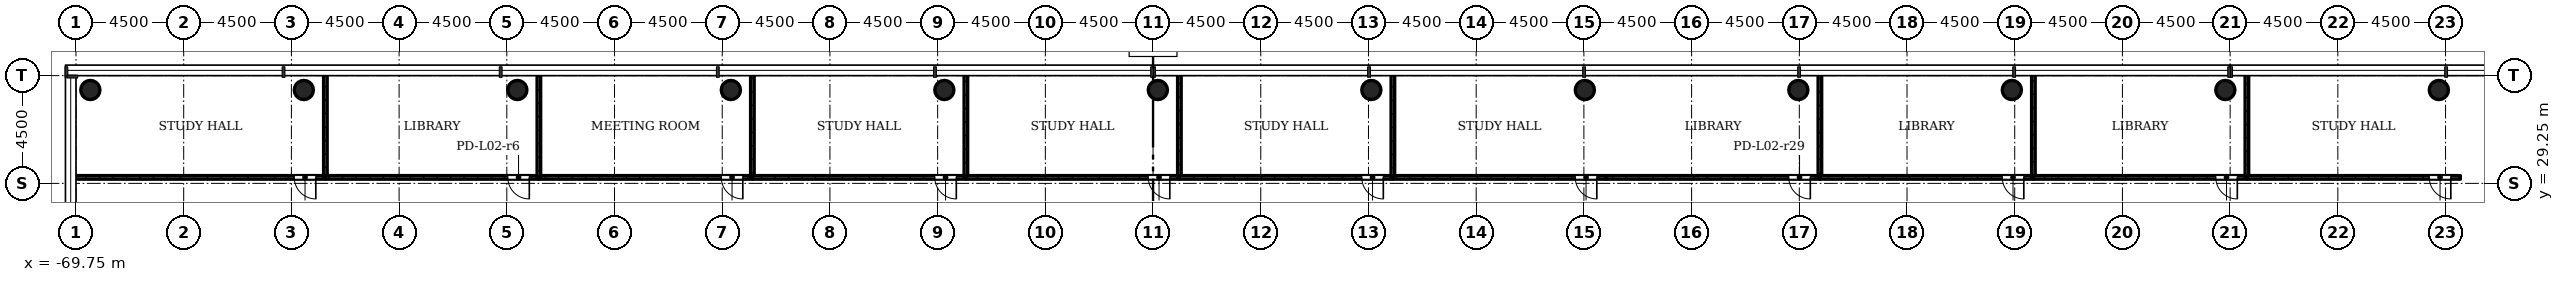
"""IFC4 building model, lengths in metres.
Left out: names, types, materials, properties, quantities, classifications, styles, units other than length and angle.
Written with IfcOpenShell. Run it as: python <this file> out.ifc"""

import sys

from ifc_helpers import new_model, si_unit, direction, frame, frame_2d, origin, origin_2d, place, context, subcontext, project, spatial, rectangle, hollow_circle, extrude, element, fill, save


model = new_model("IFC4")
c1 = context("Model", 3, precision=1e-05, world=origin(), true_north=direction((0.0, 1.0)))
c2 = subcontext(c1, "Body", "Model", "MODEL_VIEW")
j1 = project(units=[si_unit("LENGTHUNIT", "METRE"), si_unit("PLANEANGLEUNIT", "RADIAN")], contexts=[c1])
p1 = place(None, origin())
s1 = spatial("IfcSite", under=j1, at=p1, CompositionType="ELEMENT")
p2 = place(p1, origin())
s2 = spatial("IfcBuilding", under=s1, at=p2, CompositionType="ELEMENT")
p3 = place(p2, frame((0.0, 0.0, 11.0)))
s3 = spatial("IfcBuildingStorey", under=s2, at=p3, CompositionType="ELEMENT", Elevation=11.0)
for number, where, z_axis, x_axis in (
    (1, (-69.15, 33.15, 0.0), (0.0, 0.0, 1.0), (1.0, 0.0, 0.0)),
    (2, (-60.23, 33.15, 0.0), (0.0, 0.0, 1.0), (1.0, 0.0, 0.0)),
    (3, (-51.31, 33.15, 0.0), (0.0, 0.0, 1.0), (1.0, 0.0, 0.0)),
    (4, (-42.39, 33.15, 0.0), (0.0, 0.0, 1.0), (1.0, 0.0, 0.0)),
    (5, (-33.47, 33.15, 0.0), (0.0, 0.0, 1.0), (1.0, 0.0, 0.0)),
    (6, (-24.55, 33.15, 0.0), (0.0, 0.0, 1.0), (1.0, 0.0, 0.0)),
    (7, (-15.63, 33.15, 0.0), (0.0, 0.0, 1.0), (1.0, 0.0, 0.0)),
    (8, (-6.71, 33.15, 0.0), (0.0, 0.0, 1.0), (1.0, 0.0, 0.0)),
    (9, (2.21, 33.15, 0.0), (0.0, 0.0, 1.0), (1.0, 0.0, 0.0)),
    (10, (11.13, 33.15, 0.0), (0.0, 0.0, 1.0), (1.0, 0.0, 0.0)),
    (11, (20.05, 33.15, 0.0), (0.0, 0.0, 1.0), (1.0, 0.0, 0.0)),
    (12, (28.97, 33.15, 0.0), (0.0, 0.0, 1.0), (1.0, 0.0, 0.0)),
):
    element("IfcColumn", number, at=place(p3, frame(where, z_axis=z_axis, x_axis=x_axis)), inside=s3, PredefinedType="COLUMN", context=c2, shape_type="SweptSolid", body=[
        extrude(hollow_circle(Radius=0.4, WallThickness=0.028, at=origin_2d()), origin(), (0.0, 0.0, 1.0), 4.5),
    ])
p4 = place(p3, frame((-59.33, 29.5, 0.0), z_axis=(0.0, 0.0, 1.0), x_axis=(-1.0, 0.0, 0.0)))
e13 = element("IfcWall", 13, at=p4, inside=s3, PredefinedType="PARTITIONING", context=c2, shape_type="SweptSolid", body=[
    extrude(rectangle(XDim=10.52, YDim=0.15, at=frame_2d((5.26, 0.0))), origin(), (0.0, 0.0, 1.0), 4.08),
])
p5 = place(p4, frame((0.4, 0.0, 0.0)))
e14 = element("IfcOpeningElement", 14, at=p5, cuts=e13, PredefinedType="OPENING", context=c2, shape_type="SweptSolid", body=[
    extrude(rectangle(XDim=0.9, YDim=2.1, at=frame_2d((0.45, 1.05))), frame((0.0, 0.085, 0.0), z_axis=(0.0, -1.0, 0.0), x_axis=(1.0, 0.0, 0.0)), (0.0, 0.0, 1.0), 0.17),
])
p6 = place(p3, frame((-59.33, 33.85, 0.0), z_axis=(0.0, 0.0, 1.0), x_axis=(0.0, -1.0, 0.0)))
e15 = element("IfcWall", 15, at=p6, inside=s3, PredefinedType="PARTITIONING", context=c2, shape_type="SweptSolid", body=[
    extrude(rectangle(XDim=4.35, YDim=0.15, at=frame_2d((2.175, 0.0))), origin(), (0.0, 0.0, 1.0), 4.08),
])
p7 = place(p3, frame((-50.41, 29.5, 0.0), z_axis=(0.0, 0.0, 1.0), x_axis=(-1.0, 0.0, 0.0)))
e16 = element("IfcWall", 16, at=p7, inside=s3, PredefinedType="PARTITIONING", context=c2, shape_type="SweptSolid", body=[
    extrude(rectangle(XDim=8.92, YDim=0.15, at=frame_2d((4.46, 0.0))), origin(), (0.0, 0.0, 1.0), 4.08),
])
p8 = place(p7, frame((0.4, 0.0, 0.0)))
e17 = element("IfcOpeningElement", 17, at=p8, cuts=e16, PredefinedType="OPENING", context=c2, shape_type="SweptSolid", body=[
    extrude(rectangle(XDim=0.9, YDim=2.1, at=frame_2d((0.45, 1.05))), frame((0.0, 0.085, 0.0), z_axis=(0.0, -1.0, 0.0), x_axis=(1.0, 0.0, 0.0)), (0.0, 0.0, 1.0), 0.17),
])
p9 = place(p3, frame((-41.49, 29.5, 0.0), z_axis=(0.0, 0.0, 1.0), x_axis=(-1.0, 0.0, 0.0)))
e18 = element("IfcWall", 18, at=p9, inside=s3, PredefinedType="PARTITIONING", context=c2, shape_type="SweptSolid", body=[
    extrude(rectangle(XDim=8.92, YDim=0.15, at=frame_2d((4.46, 0.0))), origin(), (0.0, 0.0, 1.0), 4.08),
])
p10 = place(p9, frame((0.4, 0.0, 0.0)))
e19 = element("IfcOpeningElement", 19, at=p10, cuts=e18, PredefinedType="OPENING", context=c2, shape_type="SweptSolid", body=[
    extrude(rectangle(XDim=0.9, YDim=2.1, at=frame_2d((0.45, 1.05))), frame((0.0, 0.085, 0.0), z_axis=(0.0, -1.0, 0.0), x_axis=(1.0, 0.0, 0.0)), (0.0, 0.0, 1.0), 0.17),
])
for number, where, z_axis, x_axis in (
    (20, (-50.41, 29.5, 0.0), (0.0, 0.0, 1.0), (0.0, 1.0, 0.0)),
    (21, (-41.49, 33.85, 0.0), (0.0, 0.0, 1.0), (0.0, -1.0, 0.0)),
):
    element("IfcWall", number, at=place(p3, frame(where, z_axis=z_axis, x_axis=x_axis)), inside=s3, PredefinedType="PARTITIONING", context=c2, shape_type="SweptSolid", body=[
        extrude(rectangle(XDim=4.35, YDim=0.15, at=frame_2d((2.175, 0.0))), origin(), (0.0, 0.0, 1.0), 4.08),
    ])
p11 = place(p3, frame((-32.57, 29.5, 0.0), z_axis=(0.0, 0.0, 1.0), x_axis=(-1.0, 0.0, 0.0)))
e22 = element("IfcWall", 22, at=p11, inside=s3, PredefinedType="PARTITIONING", context=c2, shape_type="SweptSolid", body=[
    extrude(rectangle(XDim=8.92, YDim=0.15, at=frame_2d((4.46, 0.0))), origin(), (0.0, 0.0, 1.0), 4.08),
])
p12 = place(p11, frame((0.4, 0.0, 0.0)))
e23 = element("IfcOpeningElement", 23, at=p12, cuts=e22, PredefinedType="OPENING", context=c2, shape_type="SweptSolid", body=[
    extrude(rectangle(XDim=0.9, YDim=2.1, at=frame_2d((0.45, 1.05))), frame((0.0, 0.085, 0.0), z_axis=(0.0, -1.0, 0.0), x_axis=(1.0, 0.0, 0.0)), (0.0, 0.0, 1.0), 0.17),
])
p13 = place(p3, frame((-32.57, 33.85, 0.0), z_axis=(0.0, 0.0, 1.0), x_axis=(0.0, -1.0, 0.0)))
e24 = element("IfcWall", 24, at=p13, inside=s3, PredefinedType="PARTITIONING", context=c2, shape_type="SweptSolid", body=[
    extrude(rectangle(XDim=4.35, YDim=0.15, at=frame_2d((2.175, 0.0))), origin(), (0.0, 0.0, 1.0), 4.08),
])
p14 = place(p3, frame((-23.65, 29.5, 0.0), z_axis=(0.0, 0.0, 1.0), x_axis=(-1.0, 0.0, 0.0)))
e25 = element("IfcWall", 25, at=p14, inside=s3, PredefinedType="PARTITIONING", context=c2, shape_type="SweptSolid", body=[
    extrude(rectangle(XDim=8.92, YDim=0.15, at=frame_2d((4.46, 0.0))), origin(), (0.0, 0.0, 1.0), 4.08),
])
p15 = place(p14, frame((0.4, 0.0, 0.0)))
e26 = element("IfcOpeningElement", 26, at=p15, cuts=e25, PredefinedType="OPENING", context=c2, shape_type="SweptSolid", body=[
    extrude(rectangle(XDim=0.9, YDim=2.1, at=frame_2d((0.45, 1.05))), frame((0.0, 0.085, 0.0), z_axis=(0.0, -1.0, 0.0), x_axis=(1.0, 0.0, 0.0)), (0.0, 0.0, 1.0), 0.17),
])
p16 = place(p3, frame((-23.65, 33.85, 0.0), z_axis=(0.0, 0.0, 1.0), x_axis=(0.0, -1.0, 0.0)))
e27 = element("IfcWall", 27, at=p16, inside=s3, PredefinedType="PARTITIONING", context=c2, shape_type="SweptSolid", body=[
    extrude(rectangle(XDim=4.35, YDim=0.15, at=frame_2d((2.175, 0.0))), origin(), (0.0, 0.0, 1.0), 4.08),
])
p17 = place(p3, frame((-14.73, 29.5, 0.0), z_axis=(0.0, 0.0, 1.0), x_axis=(-1.0, 0.0, 0.0)))
e28 = element("IfcWall", 28, at=p17, inside=s3, PredefinedType="PARTITIONING", context=c2, shape_type="SweptSolid", body=[
    extrude(rectangle(XDim=8.92, YDim=0.15, at=frame_2d((4.46, 0.0))), origin(), (0.0, 0.0, 1.0), 4.08),
])
p18 = place(p17, frame((0.4, 0.0, 0.0)))
e29 = element("IfcOpeningElement", 29, at=p18, cuts=e28, PredefinedType="OPENING", context=c2, shape_type="SweptSolid", body=[
    extrude(rectangle(XDim=0.9, YDim=2.1, at=frame_2d((0.45, 1.05))), frame((0.0, 0.085, 0.0), z_axis=(0.0, -1.0, 0.0), x_axis=(1.0, 0.0, 0.0)), (0.0, 0.0, 1.0), 0.17),
])
p19 = place(p3, frame((-14.73, 33.85, 0.0), z_axis=(0.0, 0.0, 1.0), x_axis=(0.0, -1.0, 0.0)))
e30 = element("IfcWall", 30, at=p19, inside=s3, PredefinedType="PARTITIONING", context=c2, shape_type="SweptSolid", body=[
    extrude(rectangle(XDim=4.35, YDim=0.15, at=frame_2d((2.175, 0.0))), origin(), (0.0, 0.0, 1.0), 4.08),
])
p20 = place(p3, frame((-5.81, 29.5, 0.0), z_axis=(0.0, 0.0, 1.0), x_axis=(-1.0, 0.0, 0.0)))
e31 = element("IfcWall", 31, at=p20, inside=s3, PredefinedType="PARTITIONING", context=c2, shape_type="SweptSolid", body=[
    extrude(rectangle(XDim=8.92, YDim=0.15, at=frame_2d((4.46, 0.0))), origin(), (0.0, 0.0, 1.0), 4.08),
])
p21 = place(p20, frame((0.4, 0.0, 0.0)))
e32 = element("IfcOpeningElement", 32, at=p21, cuts=e31, PredefinedType="OPENING", context=c2, shape_type="SweptSolid", body=[
    extrude(rectangle(XDim=0.9, YDim=2.1, at=frame_2d((0.45, 1.05))), frame((0.0, 0.085, 0.0), z_axis=(0.0, -1.0, 0.0), x_axis=(1.0, 0.0, 0.0)), (0.0, 0.0, 1.0), 0.17),
])
p22 = place(p3, frame((3.11, 29.5, 0.0), z_axis=(0.0, 0.0, 1.0), x_axis=(-1.0, 0.0, 0.0)))
e33 = element("IfcWall", 33, at=p22, inside=s3, PredefinedType="PARTITIONING", context=c2, shape_type="SweptSolid", body=[
    extrude(rectangle(XDim=8.92, YDim=0.15, at=frame_2d((4.46, 0.0))), origin(), (0.0, 0.0, 1.0), 4.08),
])
p23 = place(p22, frame((0.4, 0.0, 0.0)))
e34 = element("IfcOpeningElement", 34, at=p23, cuts=e33, PredefinedType="OPENING", context=c2, shape_type="SweptSolid", body=[
    extrude(rectangle(XDim=0.9, YDim=2.1, at=frame_2d((0.45, 1.05))), frame((0.0, 0.085, 0.0), z_axis=(0.0, -1.0, 0.0), x_axis=(1.0, 0.0, 0.0)), (0.0, 0.0, 1.0), 0.17),
])
p24 = place(p3, frame((3.11, 33.85, 0.0), z_axis=(0.0, 0.0, 1.0), x_axis=(0.0, -1.0, 0.0)))
e35 = element("IfcWall", 35, at=p24, inside=s3, PredefinedType="PARTITIONING", context=c2, shape_type="SweptSolid", body=[
    extrude(rectangle(XDim=4.35, YDim=0.15, at=frame_2d((2.175, 0.0))), origin(), (0.0, 0.0, 1.0), 4.08),
])
p25 = place(p3, frame((12.03, 29.5, 0.0), z_axis=(0.0, 0.0, 1.0), x_axis=(-1.0, 0.0, 0.0)))
e36 = element("IfcWall", 36, at=p25, inside=s3, PredefinedType="PARTITIONING", context=c2, shape_type="SweptSolid", body=[
    extrude(rectangle(XDim=8.92, YDim=0.15, at=frame_2d((4.46, 0.0))), origin(), (0.0, 0.0, 1.0), 4.08),
])
p26 = place(p25, frame((0.4, 0.0, 0.0)))
e37 = element("IfcOpeningElement", 37, at=p26, cuts=e36, PredefinedType="OPENING", context=c2, shape_type="SweptSolid", body=[
    extrude(rectangle(XDim=0.9, YDim=2.1, at=frame_2d((0.45, 1.05))), frame((0.0, 0.085, 0.0), z_axis=(0.0, -1.0, 0.0), x_axis=(1.0, 0.0, 0.0)), (0.0, 0.0, 1.0), 0.17),
])
p27 = place(p3, frame((12.03, 33.85, 0.0), z_axis=(0.0, 0.0, 1.0), x_axis=(0.0, -1.0, 0.0)))
e38 = element("IfcWall", 38, at=p27, inside=s3, PredefinedType="PARTITIONING", context=c2, shape_type="SweptSolid", body=[
    extrude(rectangle(XDim=4.35, YDim=0.15, at=frame_2d((2.175, 0.0))), origin(), (0.0, 0.0, 1.0), 4.08),
])
p28 = place(p3, frame((20.95, 29.5, 0.0), z_axis=(0.0, 0.0, 1.0), x_axis=(-1.0, 0.0, 0.0)))
e39 = element("IfcWall", 39, at=p28, inside=s3, PredefinedType="PARTITIONING", context=c2, shape_type="SweptSolid", body=[
    extrude(rectangle(XDim=8.92, YDim=0.15, at=frame_2d((4.46, 0.0))), origin(), (0.0, 0.0, 1.0), 4.08),
])
p29 = place(p28, frame((0.4, 0.0, 0.0)))
e40 = element("IfcOpeningElement", 40, at=p29, cuts=e39, PredefinedType="OPENING", context=c2, shape_type="SweptSolid", body=[
    extrude(rectangle(XDim=0.9, YDim=2.1, at=frame_2d((0.45, 1.05))), frame((0.0, 0.085, 0.0), z_axis=(0.0, -1.0, 0.0), x_axis=(1.0, 0.0, 0.0)), (0.0, 0.0, 1.0), 0.17),
])
p30 = place(p3, frame((20.95, 33.85, 0.0), z_axis=(0.0, 0.0, 1.0), x_axis=(0.0, -1.0, 0.0)))
e41 = element("IfcWall", 41, at=p30, inside=s3, PredefinedType="PARTITIONING", context=c2, shape_type="SweptSolid", body=[
    extrude(rectangle(XDim=4.35, YDim=0.15, at=frame_2d((2.175, 0.0))), origin(), (0.0, 0.0, 1.0), 4.08),
])
p31 = place(p3, frame((29.87, 29.5, 0.0), z_axis=(0.0, 0.0, 1.0), x_axis=(-1.0, 0.0, 0.0)))
e42 = element("IfcWall", 42, at=p31, inside=s3, PredefinedType="PARTITIONING", context=c2, shape_type="SweptSolid", body=[
    extrude(rectangle(XDim=8.92, YDim=0.15, at=frame_2d((4.46, 0.0))), origin(), (0.0, 0.0, 1.0), 4.08),
])
p32 = place(p31, frame((0.4, 0.0, 0.0)))
e43 = element("IfcOpeningElement", 43, at=p32, cuts=e42, PredefinedType="OPENING", context=c2, shape_type="SweptSolid", body=[
    extrude(rectangle(XDim=0.9, YDim=2.1, at=frame_2d((0.45, 1.05))), frame((0.0, 0.085, 0.0), z_axis=(0.0, -1.0, 0.0), x_axis=(1.0, 0.0, 0.0)), (0.0, 0.0, 1.0), 0.17),
])
p33 = place(p5, origin())
e44 = element("IfcDoor", 44, at=p33, inside=s3, OperationType="SINGLE_SWING_RIGHT", PredefinedType="DOOR", context=c2, shape_type="SweptSolid", body=[
    extrude(rectangle(XDim=0.9, YDim=2.1, at=frame_2d((0.45, 1.05))), frame((0.0, 0.025, 0.0), z_axis=(0.0, -1.0, 0.0), x_axis=(1.0, 0.0, 0.0)), (0.0, 0.0, 1.0), 0.05),
])
fill(e14, e44)
p34 = place(p8, origin())
e45 = element("IfcDoor", 45, at=p34, inside=s3, OperationType="SINGLE_SWING_RIGHT", PredefinedType="DOOR", context=c2, shape_type="SweptSolid", body=[
    extrude(rectangle(XDim=0.9, YDim=2.1, at=frame_2d((0.45, 1.05))), frame((0.0, 0.025, 0.0), z_axis=(0.0, -1.0, 0.0), x_axis=(1.0, 0.0, 0.0)), (0.0, 0.0, 1.0), 0.05),
])
fill(e17, e45)
p35 = place(p10, origin())
e46 = element("IfcDoor", 46, at=p35, inside=s3, OperationType="SINGLE_SWING_RIGHT", PredefinedType="DOOR", context=c2, shape_type="SweptSolid", body=[
    extrude(rectangle(XDim=0.9, YDim=2.1, at=frame_2d((0.45, 1.05))), frame((0.0, 0.025, 0.0), z_axis=(0.0, -1.0, 0.0), x_axis=(1.0, 0.0, 0.0)), (0.0, 0.0, 1.0), 0.05),
])
fill(e19, e46)
p36 = place(p12, origin())
e47 = element("IfcDoor", 47, at=p36, inside=s3, OperationType="SINGLE_SWING_RIGHT", PredefinedType="DOOR", context=c2, shape_type="SweptSolid", body=[
    extrude(rectangle(XDim=0.9, YDim=2.1, at=frame_2d((0.45, 1.05))), frame((0.0, 0.025, 0.0), z_axis=(0.0, -1.0, 0.0), x_axis=(1.0, 0.0, 0.0)), (0.0, 0.0, 1.0), 0.05),
])
fill(e23, e47)
p37 = place(p15, origin())
e48 = element("IfcDoor", 48, at=p37, inside=s3, OperationType="SINGLE_SWING_RIGHT", PredefinedType="DOOR", context=c2, shape_type="SweptSolid", body=[
    extrude(rectangle(XDim=0.9, YDim=2.1, at=frame_2d((0.45, 1.05))), frame((0.0, 0.025, 0.0), z_axis=(0.0, -1.0, 0.0), x_axis=(1.0, 0.0, 0.0)), (0.0, 0.0, 1.0), 0.05),
])
fill(e26, e48)
p38 = place(p18, origin())
e49 = element("IfcDoor", 49, at=p38, inside=s3, OperationType="SINGLE_SWING_RIGHT", PredefinedType="DOOR", context=c2, shape_type="SweptSolid", body=[
    extrude(rectangle(XDim=0.9, YDim=2.1, at=frame_2d((0.45, 1.05))), frame((0.0, 0.025, 0.0), z_axis=(0.0, -1.0, 0.0), x_axis=(1.0, 0.0, 0.0)), (0.0, 0.0, 1.0), 0.05),
])
fill(e29, e49)
p39 = place(p21, origin())
e50 = element("IfcDoor", 50, at=p39, inside=s3, OperationType="SINGLE_SWING_RIGHT", PredefinedType="DOOR", context=c2, shape_type="SweptSolid", body=[
    extrude(rectangle(XDim=0.9, YDim=2.1, at=frame_2d((0.45, 1.05))), frame((0.0, 0.025, 0.0), z_axis=(0.0, -1.0, 0.0), x_axis=(1.0, 0.0, 0.0)), (0.0, 0.0, 1.0), 0.05),
])
fill(e32, e50)
p40 = place(p23, origin())
e51 = element("IfcDoor", 51, at=p40, inside=s3, OperationType="SINGLE_SWING_RIGHT", PredefinedType="DOOR", context=c2, shape_type="SweptSolid", body=[
    extrude(rectangle(XDim=0.9, YDim=2.1, at=frame_2d((0.45, 1.05))), frame((0.0, 0.025, 0.0), z_axis=(0.0, -1.0, 0.0), x_axis=(1.0, 0.0, 0.0)), (0.0, 0.0, 1.0), 0.05),
])
fill(e34, e51)
p41 = place(p26, origin())
e52 = element("IfcDoor", 52, at=p41, inside=s3, OperationType="SINGLE_SWING_RIGHT", PredefinedType="DOOR", context=c2, shape_type="SweptSolid", body=[
    extrude(rectangle(XDim=0.9, YDim=2.1, at=frame_2d((0.45, 1.05))), frame((0.0, 0.025, 0.0), z_axis=(0.0, -1.0, 0.0), x_axis=(1.0, 0.0, 0.0)), (0.0, 0.0, 1.0), 0.05),
])
fill(e37, e52)
p42 = place(p29, origin())
e53 = element("IfcDoor", 53, at=p42, inside=s3, OperationType="SINGLE_SWING_RIGHT", PredefinedType="DOOR", context=c2, shape_type="SweptSolid", body=[
    extrude(rectangle(XDim=0.9, YDim=2.1, at=frame_2d((0.45, 1.05))), frame((0.0, 0.025, 0.0), z_axis=(0.0, -1.0, 0.0), x_axis=(1.0, 0.0, 0.0)), (0.0, 0.0, 1.0), 0.05),
])
fill(e40, e53)
p43 = place(p32, origin())
e54 = element("IfcDoor", 54, at=p43, inside=s3, OperationType="SINGLE_SWING_RIGHT", PredefinedType="DOOR", context=c2, shape_type="SweptSolid", body=[
    extrude(rectangle(XDim=0.9, YDim=2.1, at=frame_2d((0.45, 1.05))), frame((0.0, 0.025, 0.0), z_axis=(0.0, -1.0, 0.0), x_axis=(1.0, 0.0, 0.0)), (0.0, 0.0, 1.0), 0.05),
])
fill(e43, e54)
save(model, sys.argv[1])
